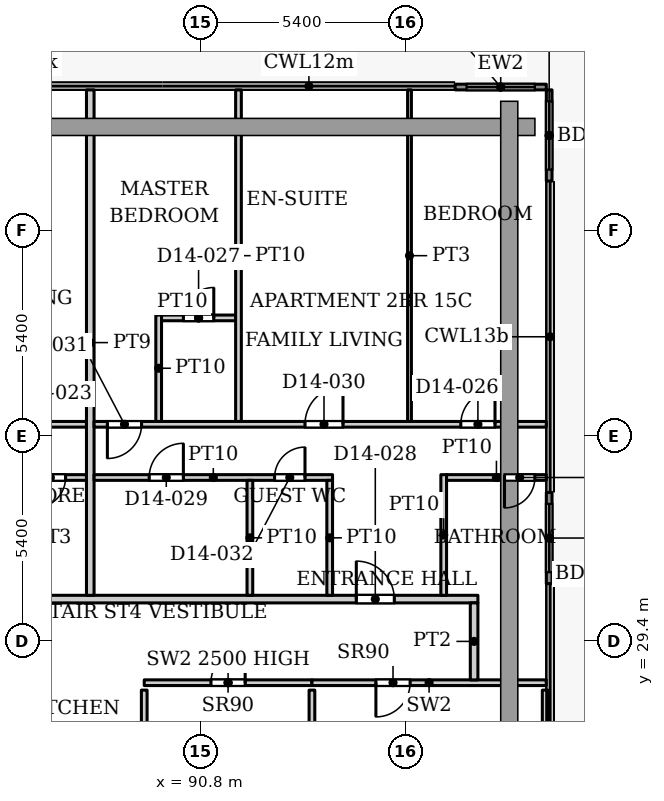
"""IFC4 building model, lengths in metres.
Left out: names, types, materials, properties, quantities, classifications, styles, units other than length and angle.
Written with IfcOpenShell. Run it as: python <this file> out.ifc"""

import sys

from ifc_helpers import new_model, si_unit, direction, frame, frame_2d, origin, place, context, subcontext, project, spatial, rectangle, extrude, source, transform, mapped, element, fill, save


model = new_model("IFC4")
c1 = context("Model", 3, precision=1e-05, world=origin(), true_north=direction((0.0, 1.0)))
c2 = subcontext(c1, "Body", "Model", "MODEL_VIEW")
j1 = project(units=[si_unit("LENGTHUNIT", "METRE"), si_unit("PLANEANGLEUNIT", "RADIAN")], contexts=[c1])
p1 = place(None, origin())
s1 = spatial("IfcSite", under=j1, at=p1, CompositionType="ELEMENT")
p2 = place(p1, origin())
s2 = spatial("IfcBuilding", under=s1, at=p2, CompositionType="ELEMENT")
p3 = place(p2, frame((0.0, 0.0, 65.6)))
s3 = spatial("IfcBuildingStorey", under=s2, at=p3, CompositionType="ELEMENT", Elevation=65.6)
p4 = place(p3, frame((97.5, 43.975, 0.0), z_axis=(0.0, 0.0, 1.0), x_axis=(1.0, 0.0, 0.0)))
e1 = element("IfcWall", 1, at=p4, inside=s3, PredefinedType="SOLIDWALL", context=c2, shape_type="SweptSolid", body=[
    extrude(rectangle(XDim=2.4, YDim=0.15, at=frame_2d((1.2, 0.0))), origin(), (0.0, 0.0, 1.0), 3.75),
])
p5 = place(p4, frame((0.3, 0.0, 0.0)))
e2 = element("IfcOpeningElement", 2, at=p5, cuts=e1, PredefinedType="OPENING", context=c2, shape_type="SweptSolid", body=[
    extrude(rectangle(XDim=1.8, YDim=2.4, at=frame_2d((0.9, 1.2))), frame((0.0, 0.085, 0.0), z_axis=(0.0, -1.0, 0.0), x_axis=(1.0, 0.0, 0.0)), (0.0, 0.0, 1.0), 0.17),
])
p6 = place(p3, frame((99.975, 43.9, 0.0), z_axis=(0.0, 0.0, 1.0), x_axis=(0.0, -1.0, 0.0)))
e3 = element("IfcWall", 3, at=p6, inside=s3, PredefinedType="SOLIDWALL", context=c2, shape_type="SweptSolid", body=[
    extrude(rectangle(XDim=2.4, YDim=0.15, at=frame_2d((1.2, 0.0))), origin(), (0.0, 0.0, 1.0), 3.75),
])
p7 = place(p6, frame((0.3, 0.0, 0.0)))
e4 = element("IfcOpeningElement", 4, at=p7, cuts=e3, PredefinedType="OPENING", context=c2, shape_type="SweptSolid", body=[
    extrude(rectangle(XDim=1.8, YDim=2.4, at=frame_2d((0.9, 1.2))), frame((0.0, 0.085, 0.0), z_axis=(0.0, -1.0, 0.0), x_axis=(1.0, 0.0, 0.0)), (0.0, 0.0, 1.0), 0.17),
])
p8 = place(p3, frame((99.975, 33.307, 0.0), z_axis=(0.0, 0.0, 1.0), x_axis=(0.0, -1.0, 0.0)))
e5 = element("IfcWall", 5, at=p8, inside=s3, PredefinedType="SOLIDWALL", context=c2, shape_type="SweptSolid", body=[
    extrude(rectangle(XDim=2.4, YDim=0.15, at=frame_2d((1.2, 0.0))), origin(), (0.0, 0.0, 1.0), 3.75),
])
p9 = place(p8, frame((0.3, 0.0, 0.0)))
e6 = element("IfcOpeningElement", 6, at=p9, cuts=e5, PredefinedType="OPENING", context=c2, shape_type="SweptSolid", body=[
    extrude(rectangle(XDim=1.8, YDim=2.4, at=frame_2d((0.9, 1.2))), frame((0.0, 0.085, 0.0), z_axis=(0.0, -1.0, 0.0), x_axis=(1.0, 0.0, 0.0)), (0.0, 0.0, 1.0), 0.17),
])
p10 = place(p3, frame((89.32, 28.3, 0.0), z_axis=(0.0, 0.0, 1.0), x_axis=(1.0, 0.0, 0.0)))
e7 = element("IfcWall", 7, at=p10, inside=s3, PredefinedType="PARTITIONING", context=c2, shape_type="SweptSolid", body=[
    extrude(rectangle(XDim=4.413, YDim=0.15, at=frame_2d((2.207, 0.0))), origin(), (0.0, 0.0, 1.0), 2.5),
])
p11 = place(p10, frame((1.756, 0.0, 0.0)))
e8 = element("IfcOpeningElement", 8, at=p11, cuts=e7, PredefinedType="OPENING", context=c2, shape_type="SweptSolid", body=[
    extrude(rectangle(XDim=0.9, YDim=2.2, at=frame_2d((0.45, 1.1))), frame((0.0, 0.085, 0.0), z_axis=(0.0, -1.0, 0.0), x_axis=(1.0, 0.0, 0.0)), (0.0, 0.0, 1.0), 0.17),
])
p12 = place(p3, frame((89.32, 25.62, 0.0), z_axis=(0.0, 0.0, 1.0), x_axis=(0.0, 1.0, 0.0)))
e9 = element("IfcWall", 9, at=p12, inside=s3, PredefinedType="PARTITIONING", context=c2, shape_type="SweptSolid", body=[
    extrude(rectangle(XDim=2.485, YDim=0.15, at=frame_2d((1.242, 0.0))), origin(), (0.0, 0.0, 1.0), 3.9),
])
p13 = place(p3, frame((93.733, 21.338, 0.0), z_axis=(0.0, 0.0, 1.0), x_axis=(0.0, 1.0, 0.0)))
e10 = element("IfcWall", 10, at=p13, inside=s3, PredefinedType="PARTITIONING", context=c2, shape_type="SweptSolid", body=[
    extrude(rectangle(XDim=6.767, YDim=0.15, at=frame_2d((3.384, 0.0))), origin(), (0.0, 0.0, 1.0), 3.9),
])
p14 = place(p3, frame((93.733, 28.3, 0.0), z_axis=(0.0, 0.0, 1.0), x_axis=(1.0, 0.0, 0.0)))
e11 = element("IfcWall", 11, at=p14, inside=s3, PredefinedType="PARTITIONING", context=c2, shape_type="SweptSolid", body=[
    extrude(rectangle(XDim=6.165, YDim=0.15, at=frame_2d((3.083, 0.0))), origin(), (0.0, 0.0, 1.0), 3.9),
])
p15 = place(p14, frame((1.683, 0.0, 0.0)))
e12 = element("IfcOpeningElement", 12, at=p15, cuts=e11, PredefinedType="OPENING", context=c2, shape_type="SweptSolid", body=[
    extrude(rectangle(XDim=0.9, YDim=2.2, at=frame_2d((0.45, 1.1))), frame((0.0, 0.085, 0.0), z_axis=(0.0, -1.0, 0.0), x_axis=(1.0, 0.0, 0.0)), (0.0, 0.0, 1.0), 0.17),
])
p16 = place(p3, frame((99.87, 21.015, 0.0), z_axis=(0.0, 0.0, 1.0), x_axis=(0.0, 1.0, 0.0)))
e13 = element("IfcWall", 13, at=p16, inside=s3, PredefinedType="PARTITIONING", context=c2, shape_type="SweptSolid", body=[
    extrude(rectangle(XDim=7.09, YDim=0.15, at=frame_2d((3.545, 0.0))), origin(), (0.0, 0.0, 1.0), 3.9),
])
p17 = place(p3, frame((55.9, 30.5, 0.0), z_axis=(0.0, 0.0, 1.0), x_axis=(1.0, 0.0, 0.0)))
e14 = element("IfcWall", 14, at=p17, inside=s3, PredefinedType="PARTITIONING", context=c2, shape_type="SweptSolid", body=[
    extrude(rectangle(XDim=42.2, YDim=0.2, at=frame_2d((21.1, 0.0))), origin(), (0.0, 0.0, 1.0), 3.6),
])
p18 = place(p17, frame((14.7, 0.0, 0.0)))
e15 = element("IfcOpeningElement", 15, at=p18, cuts=e14, PredefinedType="OPENING", context=c2, shape_type="SweptSolid", body=[
    extrude(rectangle(XDim=1.0, YDim=2.1, at=frame_2d((0.5, 1.05))), frame((0.0, 0.11, 0.0), z_axis=(0.0, -1.0, 0.0), x_axis=(1.0, 0.0, 0.0)), (0.0, 0.0, 1.0), 0.22),
])
p19 = place(p17, frame((27.9, 0.0, 0.0)))
e16 = element("IfcOpeningElement", 16, at=p19, cuts=e14, PredefinedType="OPENING", context=c2, shape_type="SweptSolid", body=[
    extrude(rectangle(XDim=1.0, YDim=2.1, at=frame_2d((0.5, 1.05))), frame((0.0, 0.11, 0.0), z_axis=(0.0, -1.0, 0.0), x_axis=(1.0, 0.0, 0.0)), (0.0, 0.0, 1.0), 0.22),
])
p20 = place(p17, frame((39.0, 0.0, 0.0)))
e17 = element("IfcOpeningElement", 17, at=p20, cuts=e14, PredefinedType="OPENING", context=c2, shape_type="SweptSolid", body=[
    extrude(rectangle(XDim=1.0, YDim=2.1, at=frame_2d((0.5, 1.05))), frame((0.0, 0.11, 0.0), z_axis=(0.0, -1.0, 0.0), x_axis=(1.0, 0.0, 0.0)), (0.0, 0.0, 1.0), 0.22),
])
p21 = place(p3, frame((74.5, 35.1, 0.0), z_axis=(0.0, 0.0, 1.0), x_axis=(1.0, 0.0, 0.0)))
e18 = element("IfcWall", 18, at=p21, inside=s3, PredefinedType="PARTITIONING", context=c2, shape_type="SweptSolid", body=[
    extrude(rectangle(XDim=13.3, YDim=0.15, at=frame_2d((6.65, 0.0))), origin(), (0.0, 0.0, 1.0), 3.6),
])
p22 = place(p21, frame((1.1, 0.0, 0.0)))
e19 = element("IfcOpeningElement", 19, at=p22, cuts=e18, PredefinedType="OPENING", context=c2, shape_type="SweptSolid", body=[
    extrude(rectangle(XDim=0.9, YDim=2.1, at=frame_2d((0.45, 1.05))), frame((0.0, 0.085, 0.0), z_axis=(0.0, -1.0, 0.0), x_axis=(1.0, 0.0, 0.0)), (0.0, 0.0, 1.0), 0.17),
])
p23 = place(p21, frame((9.95, 0.0, 0.0)))
e20 = element("IfcOpeningElement", 20, at=p23, cuts=e18, PredefinedType="OPENING", context=c2, shape_type="SweptSolid", body=[
    extrude(rectangle(XDim=1.0, YDim=2.1, at=frame_2d((0.5, 1.05))), frame((0.0, 0.085, 0.0), z_axis=(0.0, -1.0, 0.0), x_axis=(1.0, 0.0, 0.0)), (0.0, 0.0, 1.0), 0.17),
])
p24 = place(p21, frame((4.25, 0.0, 0.0)))
e21 = element("IfcOpeningElement", 21, at=p24, cuts=e18, PredefinedType="OPENING", context=c2, shape_type="SweptSolid", body=[
    extrude(rectangle(XDim=0.9, YDim=2.1, at=frame_2d((0.45, 1.05))), frame((0.0, 0.085, 0.0), z_axis=(0.0, -1.0, 0.0), x_axis=(1.0, 0.0, 0.0)), (0.0, 0.0, 1.0), 0.17),
])
p25 = place(p3, frame((85.75, 33.7, 0.0), z_axis=(0.0, 0.0, 1.0), x_axis=(1.0, 0.0, 0.0)))
e22 = element("IfcWall", 22, at=p25, inside=s3, PredefinedType="PARTITIONING", context=c2, shape_type="SweptSolid", body=[
    extrude(rectangle(XDim=2.05, YDim=0.15, at=frame_2d((1.025, 0.0))), origin(), (0.0, 0.0, 1.0), 3.6),
])
p26 = place(p25, frame((0.7, 0.0, 0.0)))
e23 = element("IfcOpeningElement", 23, at=p26, cuts=e22, PredefinedType="OPENING", context=c2, shape_type="SweptSolid", body=[
    extrude(rectangle(XDim=0.8, YDim=2.1, at=frame_2d((0.4, 1.05))), frame((0.0, 0.085, 0.0), z_axis=(0.0, -1.0, 0.0), x_axis=(1.0, 0.0, 0.0)), (0.0, 0.0, 1.0), 0.17),
])
p27 = place(p3, frame((87.9, 30.6, 0.0), z_axis=(0.0, 0.0, 1.0), x_axis=(0.0, 1.0, 0.0)))
e24 = element("IfcWall", 24, at=p27, inside=s3, PredefinedType="PARTITIONING", context=c2, shape_type="SweptSolid", body=[
    extrude(rectangle(XDim=13.3, YDim=0.2, at=frame_2d((6.65, 0.0))), origin(), (0.0, 0.0, 1.0), 3.6),
])
p28 = place(p3, frame((88.0, 33.7, 0.0), z_axis=(0.0, 0.0, 1.0), x_axis=(1.0, 0.0, 0.0)))
e25 = element("IfcWall", 25, at=p28, inside=s3, PredefinedType="PARTITIONING", context=c2, shape_type="SweptSolid", body=[
    extrude(rectangle(XDim=6.275, YDim=0.15, at=frame_2d((3.137, 0.0))), origin(), (0.0, 0.0, 1.0), 3.6),
])
p29 = place(p28, frame((1.45, 0.0, 0.0)))
e26 = element("IfcOpeningElement", 26, at=p29, cuts=e25, PredefinedType="OPENING", context=c2, shape_type="SweptSolid", body=[
    extrude(rectangle(XDim=0.9, YDim=2.1, at=frame_2d((0.45, 1.05))), frame((0.0, 0.085, 0.0), z_axis=(0.0, -1.0, 0.0), x_axis=(1.0, 0.0, 0.0)), (0.0, 0.0, 1.0), 0.17),
])
p30 = place(p28, frame((4.75, 0.0, 0.0)))
e27 = element("IfcOpeningElement", 27, at=p30, cuts=e25, PredefinedType="OPENING", context=c2, shape_type="SweptSolid", body=[
    extrude(rectangle(XDim=0.8, YDim=2.1, at=frame_2d((0.4, 1.05))), frame((0.0, 0.085, 0.0), z_axis=(0.0, -1.0, 0.0), x_axis=(1.0, 0.0, 0.0)), (0.0, 0.0, 1.0), 0.17),
])
p31 = place(p3, frame((88.0, 35.1, 0.0), z_axis=(0.0, 0.0, 1.0), x_axis=(1.0, 0.0, 0.0)))
e28 = element("IfcWall", 28, at=p31, inside=s3, PredefinedType="PARTITIONING", context=c2, shape_type="SweptSolid", body=[
    extrude(rectangle(XDim=11.9, YDim=0.15, at=frame_2d((5.95, 0.0))), origin(), (0.0, 0.0, 1.0), 3.6),
])
p32 = place(p31, frame((9.65, 0.0, 0.0)))
e29 = element("IfcOpeningElement", 29, at=p32, cuts=e28, PredefinedType="OPENING", context=c2, shape_type="SweptSolid", body=[
    extrude(rectangle(XDim=0.9, YDim=2.1, at=frame_2d((0.45, 1.05))), frame((0.0, 0.085, 0.0), z_axis=(0.0, -1.0, 0.0), x_axis=(1.0, 0.0, 0.0)), (0.0, 0.0, 1.0), 0.17),
])
p33 = place(p31, frame((5.55, 0.0, 0.0)))
e30 = element("IfcOpeningElement", 30, at=p33, cuts=e28, PredefinedType="OPENING", context=c2, shape_type="SweptSolid", body=[
    extrude(rectangle(XDim=1.0, YDim=2.1, at=frame_2d((0.5, 1.05))), frame((0.0, 0.085, 0.0), z_axis=(0.0, -1.0, 0.0), x_axis=(1.0, 0.0, 0.0)), (0.0, 0.0, 1.0), 0.17),
])
p34 = place(p31, frame((0.35, 0.0, 0.0)))
e31 = element("IfcOpeningElement", 31, at=p34, cuts=e28, PredefinedType="OPENING", context=c2, shape_type="SweptSolid", body=[
    extrude(rectangle(XDim=0.9, YDim=2.1, at=frame_2d((0.45, 1.05))), frame((0.0, 0.085, 0.0), z_axis=(0.0, -1.0, 0.0), x_axis=(1.0, 0.0, 0.0)), (0.0, 0.0, 1.0), 0.17),
])
p35 = place(p3, frame((89.7, 35.175, 0.0), z_axis=(0.0, 0.0, 1.0), x_axis=(0.0, 1.0, 0.0)))
e32 = element("IfcWall", 32, at=p35, inside=s3, PredefinedType="PARTITIONING", context=c2, shape_type="SweptSolid", body=[
    extrude(rectangle(XDim=2.8, YDim=0.15, at=frame_2d((1.4, 0.0))), origin(), (0.0, 0.0, 1.0), 3.6),
])
p36 = place(p3, frame((89.775, 37.9, 0.0), z_axis=(0.0, 0.0, 1.0), x_axis=(1.0, 0.0, 0.0)))
e33 = element("IfcWall", 33, at=p36, inside=s3, PredefinedType="PARTITIONING", context=c2, shape_type="SweptSolid", body=[
    extrude(rectangle(XDim=1.95, YDim=0.15, at=frame_2d((0.975, 0.0))), origin(), (0.0, 0.0, 1.0), 3.6),
])
p37 = place(p36, frame((0.575, 0.0, 0.0)))
e34 = element("IfcOpeningElement", 34, at=p37, cuts=e33, PredefinedType="OPENING", context=c2, shape_type="SweptSolid", body=[
    extrude(rectangle(XDim=0.8, YDim=2.1, at=frame_2d((0.4, 1.05))), frame((0.0, 0.085, 0.0), z_axis=(0.0, -1.0, 0.0), x_axis=(1.0, 0.0, 0.0)), (0.0, 0.0, 1.0), 0.17),
])
p38 = place(p3, frame((91.8, 35.175, 0.0), z_axis=(0.0, 0.0, 1.0), x_axis=(0.0, 1.0, 0.0)))
e35 = element("IfcWall", 35, at=p38, inside=s3, PredefinedType="PARTITIONING", context=c2, shape_type="SweptSolid", body=[
    extrude(rectangle(XDim=8.725, YDim=0.15, at=frame_2d((4.362, 0.0))), origin(), (0.0, 0.0, 1.0), 3.6),
])
for number, where, z_axis, x_axis in (
    (36, (92.1, 30.6, 0.0), (0.0, 0.0, 1.0), (0.0, 1.0, 0.0)),
    (37, (94.2, 30.6, 0.0), (0.0, 0.0, 1.0), (0.0, 1.0, 0.0)),
):
    element("IfcWall", number, at=place(p3, frame(where, z_axis=z_axis, x_axis=x_axis)), inside=s3, PredefinedType="PARTITIONING", context=c2, shape_type="SweptSolid", body=[
        extrude(rectangle(XDim=3.025, YDim=0.15, at=frame_2d((1.512, 0.0))), origin(), (0.0, 0.0, 1.0), 3.6),
    ])
p39 = place(p3, frame((96.3, 35.175, 0.0), z_axis=(0.0, 0.0, 1.0), x_axis=(0.0, 1.0, 0.0)))
e38 = element("IfcWall", 38, at=p39, inside=s3, PredefinedType="PARTITIONING", context=c2, shape_type="SweptSolid", body=[
    extrude(rectangle(XDim=8.725, YDim=0.1, at=frame_2d((4.362, 0.0))), origin(), (0.0, 0.0, 1.0), 3.6),
])
p40 = place(p3, frame((97.2, 30.6, 0.0), z_axis=(0.0, 0.0, 1.0), x_axis=(0.0, 1.0, 0.0)))
e39 = element("IfcWall", 39, at=p40, inside=s3, PredefinedType="PARTITIONING", context=c2, shape_type="SweptSolid", body=[
    extrude(rectangle(XDim=3.175, YDim=0.15, at=frame_2d((1.587, 0.0))), origin(), (0.0, 0.0, 1.0), 3.6),
])
p41 = place(p3, frame((97.275, 33.7, 0.0), z_axis=(0.0, 0.0, 1.0), x_axis=(1.0, 0.0, 0.0)))
e40 = element("IfcWall", 40, at=p41, inside=s3, PredefinedType="PARTITIONING", context=c2, shape_type="SweptSolid", body=[
    extrude(rectangle(XDim=2.625, YDim=0.15, at=frame_2d((1.312, 0.0))), origin(), (0.0, 0.0, 1.0), 3.6),
])
p42 = place(p41, frame((1.525, 0.0, 0.0)))
e41 = element("IfcOpeningElement", 41, at=p42, cuts=e40, PredefinedType="OPENING", context=c2, shape_type="SweptSolid", body=[
    extrude(rectangle(XDim=0.8, YDim=2.1, at=frame_2d((0.4, 1.05))), frame((0.0, 0.085, 0.0), z_axis=(0.0, -1.0, 0.0), x_axis=(1.0, 0.0, 0.0)), (0.0, 0.0, 1.0), 0.17),
])
p43 = place(p3, frame((98.0, 28.374, 0.0), z_axis=(0.0, 0.0, 1.0), x_axis=(0.0, 1.0, 0.0)))
e42 = element("IfcWall", 42, at=p43, inside=s3, PredefinedType="PARTITIONING", context=c2, shape_type="SweptSolid", body=[
    extrude(rectangle(XDim=2.026, YDim=0.2, at=frame_2d((1.013, 0.0))), origin(), (0.0, 0.0, 1.0), 3.6),
])
m1 = source(origin(), c2, "Body", "SweptSolid", [
    extrude(rectangle(XDim=1.8, YDim=2.4, at=frame_2d((0.9, 1.2))), frame((0.0, 0.025, 0.0), z_axis=(0.0, -1.0, 0.0), x_axis=(1.0, 0.0, 0.0)), (0.0, 0.0, 1.0), 0.05),
])
p44 = place(p5, origin())
e43 = element("IfcDoor", 43, at=p44, inside=s3, OperationType="SLIDING_TO_LEFT", PredefinedType="DOOR", context=c2, shape_type="MappedRepresentation", body=[
    mapped(m1, transform((0.0, 0.0, 0.0), x_axis=(1.0, 0.0, 0.0), y_axis=(0.0, 1.0, 0.0), z_axis=(0.0, 0.0, 1.0), scale=1.0)),
])
fill(e2, e43)
p45 = place(p7, origin())
e44 = element("IfcDoor", 44, at=p45, inside=s3, OperationType="SLIDING_TO_LEFT", PredefinedType="DOOR", context=c2, shape_type="MappedRepresentation", body=[
    mapped(m1, transform((0.0, 0.0, 0.0), x_axis=(1.0, 0.0, 0.0), y_axis=(0.0, 1.0, 0.0), z_axis=(0.0, 0.0, 1.0), scale=1.0)),
])
fill(e4, e44)
p46 = place(p9, origin())
e45 = element("IfcDoor", 45, at=p46, inside=s3, OperationType="SLIDING_TO_LEFT", PredefinedType="DOOR", context=c2, shape_type="MappedRepresentation", body=[
    mapped(m1, transform((0.0, 0.0, 0.0), x_axis=(1.0, 0.0, 0.0), y_axis=(0.0, 1.0, 0.0), z_axis=(0.0, 0.0, 1.0), scale=1.0)),
])
fill(e6, e45)
m2 = source(origin(), c2, "Body", "SweptSolid", [
    extrude(rectangle(XDim=0.9, YDim=2.2, at=frame_2d((0.45, 1.1))), frame((0.0, 0.025, 0.0), z_axis=(0.0, -1.0, 0.0), x_axis=(1.0, 0.0, 0.0)), (0.0, 0.0, 1.0), 0.05),
])
p47 = place(p11, origin())
e46 = element("IfcDoor", 46, at=p47, inside=s3, OperationType="SINGLE_SWING_LEFT", PredefinedType="DOOR", context=c2, shape_type="MappedRepresentation", body=[
    mapped(m2, transform((0.0, 0.0, 0.0), x_axis=(1.0, 0.0, 0.0), y_axis=(0.0, 1.0, 0.0), z_axis=(0.0, 0.0, 1.0), scale=1.0)),
])
fill(e8, e46)
p48 = place(p15, origin())
e47 = element("IfcDoor", 47, at=p48, inside=s3, OperationType="SINGLE_SWING_RIGHT", PredefinedType="DOOR", context=c2, shape_type="MappedRepresentation", body=[
    mapped(m2, transform((0.0, 0.0, 0.0), x_axis=(1.0, 0.0, 0.0), y_axis=(0.0, 1.0, 0.0), z_axis=(0.0, 0.0, 1.0), scale=1.0)),
])
fill(e12, e47)
m3 = source(origin(), c2, "Body", "SweptSolid", [
    extrude(rectangle(XDim=0.8, YDim=2.1, at=frame_2d((0.4, 1.05))), frame((0.0, 0.025, 0.0), z_axis=(0.0, -1.0, 0.0), x_axis=(1.0, 0.0, 0.0)), (0.0, 0.0, 1.0), 0.05),
])
p49 = place(p26, origin())
e48 = element("IfcDoor", 48, at=p49, inside=s3, OperationType="SINGLE_SWING_RIGHT", PredefinedType="DOOR", context=c2, shape_type="MappedRepresentation", body=[
    mapped(m3, transform((0.0, 0.0, 0.0), x_axis=(1.0, 0.0, 0.0), y_axis=(0.0, 1.0, 0.0), z_axis=(0.0, 0.0, 1.0), scale=1.0)),
])
fill(e23, e48)
p50 = place(p42, origin())
e49 = element("IfcDoor", 49, at=p50, inside=s3, OperationType="SINGLE_SWING_RIGHT", PredefinedType="DOOR", context=c2, shape_type="MappedRepresentation", body=[
    mapped(m3, transform((0.0, 0.0, 0.0), x_axis=(1.0, 0.0, 0.0), y_axis=(0.0, 1.0, 0.0), z_axis=(0.0, 0.0, 1.0), scale=1.0)),
])
fill(e41, e49)
m4 = source(origin(), c2, "Body", "SweptSolid", [
    extrude(rectangle(XDim=0.9, YDim=2.1, at=frame_2d((0.45, 1.05))), frame((0.0, 0.025, 0.0), z_axis=(0.0, -1.0, 0.0), x_axis=(1.0, 0.0, 0.0)), (0.0, 0.0, 1.0), 0.05),
])
p51 = place(p32, origin())
e50 = element("IfcDoor", 50, at=p51, inside=s3, OperationType="SINGLE_SWING_LEFT", PredefinedType="DOOR", context=c2, shape_type="MappedRepresentation", body=[
    mapped(m4, transform((0.0, 0.0, 0.0), x_axis=(1.0, 0.0, 0.0), y_axis=(0.0, 1.0, 0.0), z_axis=(0.0, 0.0, 1.0), scale=1.0)),
])
fill(e29, e50)
p52 = place(p37, origin())
e51 = element("IfcDoor", 51, at=p52, inside=s3, OperationType="SINGLE_SWING_LEFT", PredefinedType="DOOR", context=c2, shape_type="MappedRepresentation", body=[
    mapped(m3, transform((0.0, 0.0, 0.0), x_axis=(1.0, 0.0, 0.0), y_axis=(0.0, 1.0, 0.0), z_axis=(0.0, 0.0, 1.0), scale=1.0)),
])
fill(e34, e51)
m5 = source(origin(), c2, "Body", "SweptSolid", [
    extrude(rectangle(XDim=1.0, YDim=2.1, at=frame_2d((0.5, 1.05))), frame((0.0, 0.025, 0.0), z_axis=(0.0, -1.0, 0.0), x_axis=(1.0, 0.0, 0.0)), (0.0, 0.0, 1.0), 0.05),
])
p53 = place(p20, origin())
e52 = element("IfcDoor", 52, at=p53, inside=s3, OperationType="SINGLE_SWING_LEFT", PredefinedType="DOOR", context=c2, shape_type="MappedRepresentation", body=[
    mapped(m5, transform((0.0, 0.0, 0.0), x_axis=(1.0, 0.0, 0.0), y_axis=(0.0, 1.0, 0.0), z_axis=(0.0, 0.0, 1.0), scale=1.0)),
])
fill(e17, e52)
p54 = place(p29, origin())
e53 = element("IfcDoor", 53, at=p54, inside=s3, OperationType="SINGLE_SWING_LEFT", PredefinedType="DOOR", context=c2, shape_type="MappedRepresentation", body=[
    mapped(m4, transform((0.0, 0.0, 0.0), x_axis=(1.0, 0.0, 0.0), y_axis=(0.0, 1.0, 0.0), z_axis=(0.0, 0.0, 1.0), scale=1.0)),
])
fill(e26, e53)
m6 = source(origin(), c2, "Body", "SweptSolid", [
    extrude(rectangle(XDim=1.0, YDim=2.1, at=frame_2d((0.5, 1.05))), frame((0.0, 0.025, 0.0), z_axis=(0.0, -1.0, 0.0), x_axis=(1.0, 0.0, 0.0)), (0.0, 0.0, 1.0), 0.05),
])
p55 = place(p33, origin())
e54 = element("IfcDoor", 54, at=p55, inside=s3, OperationType="SINGLE_SWING_LEFT", PredefinedType="DOOR", context=c2, shape_type="MappedRepresentation", body=[
    mapped(m6, transform((0.0, 0.0, 0.0), x_axis=(1.0, 0.0, 0.0), y_axis=(0.0, 1.0, 0.0), z_axis=(0.0, 0.0, 1.0), scale=1.0)),
])
fill(e30, e54)
p56 = place(p34, origin())
e55 = element("IfcDoor", 55, at=p56, inside=s3, OperationType="SINGLE_SWING_RIGHT", PredefinedType="DOOR", context=c2, shape_type="MappedRepresentation", body=[
    mapped(m4, transform((0.0, 0.0, 0.0), x_axis=(1.0, 0.0, 0.0), y_axis=(0.0, 1.0, 0.0), z_axis=(0.0, 0.0, 1.0), scale=1.0)),
])
fill(e31, e55)
p57 = place(p30, origin())
e56 = element("IfcDoor", 56, at=p57, inside=s3, OperationType="SINGLE_SWING_LEFT", PredefinedType="DOOR", context=c2, shape_type="MappedRepresentation", body=[
    mapped(m3, transform((0.0, 0.0, 0.0), x_axis=(1.0, 0.0, 0.0), y_axis=(0.0, 1.0, 0.0), z_axis=(0.0, 0.0, 1.0), scale=1.0)),
])
fill(e27, e56)
save(model, sys.argv[1])
